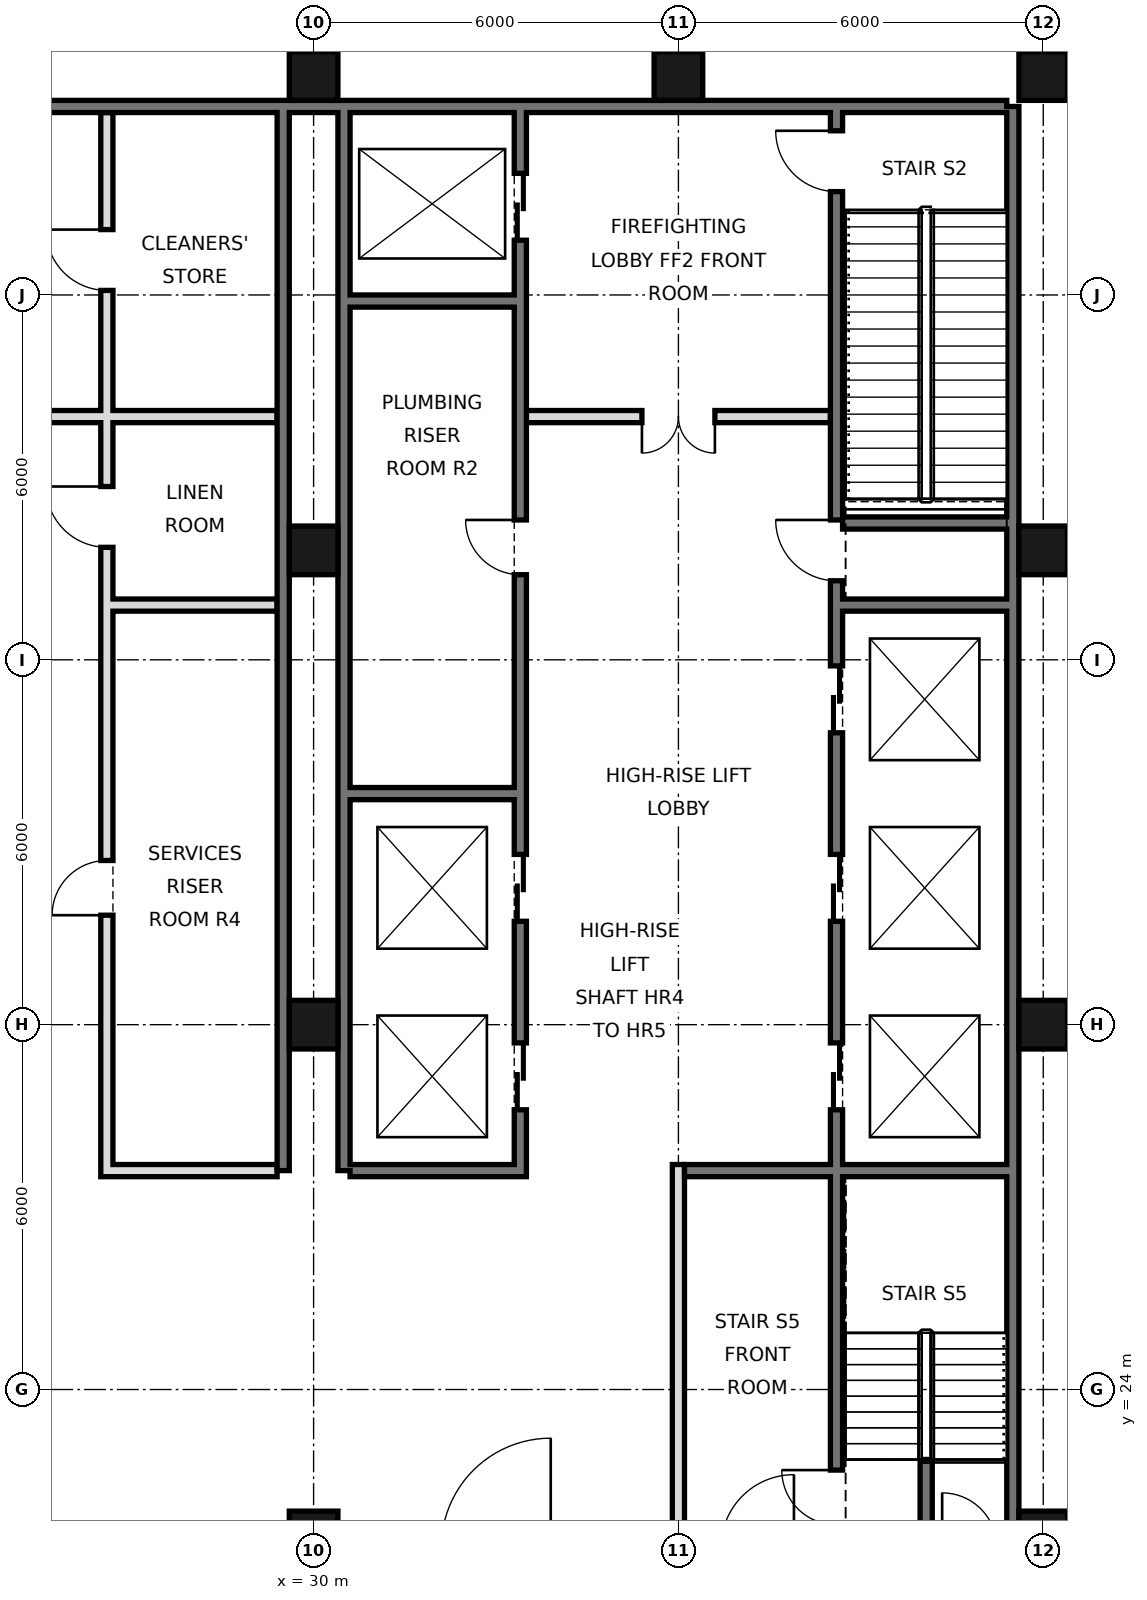
"""IFC4 building model, lengths in metres.
Left out: names, types, materials, properties, quantities, classifications, styles, units other than length and angle.
Written with IfcOpenShell. Run it as: python <this file> out.ifc"""

import sys

from ifc_helpers import new_model, si_unit, direction, frame, frame_2d, origin, origin_2d, place, context, subcontext, project, spatial, rectangle, hollow_rectangle, extrude, element, fill, save


model = new_model("IFC4")
c1 = context("Model", 3, precision=1e-05, world=origin(), true_north=direction((0.0, 1.0)))
c2 = subcontext(c1, "Body", "Model", "MODEL_VIEW")
j1 = project(units=[si_unit("LENGTHUNIT", "METRE"), si_unit("PLANEANGLEUNIT", "RADIAN")], contexts=[c1])
p1 = place(None, origin())
s1 = spatial("IfcSite", under=j1, at=p1, CompositionType="ELEMENT")
p2 = place(p1, origin())
s2 = spatial("IfcBuilding", under=s1, at=p2, CompositionType="ELEMENT")
p3 = place(p2, frame((0.0, 0.0, 186.0)))
s3 = spatial("IfcBuildingStorey", under=s2, at=p3, CompositionType="ELEMENT", Elevation=186.0)
for number, where, z_axis, x_axis in (
    (1, (30.0, 21.6, 0.0), (0.0, 0.0, 1.0), (1.0, 0.0, 0.0)),
    (2, (30.0, 30.0, 0.0), (0.0, 0.0, 1.0), (1.0, 0.0, 0.0)),
    (3, (30.0, 37.8, 0.0), (0.0, 0.0, 1.0), (1.0, 0.0, 0.0)),
    (4, (30.0, 45.6, 0.0), (0.0, 0.0, 1.0), (1.0, 0.0, 0.0)),
    (5, (36.0, 45.6, 0.0), (0.0, 0.0, 1.0), (1.0, 0.0, 0.0)),
    (6, (42.0, 21.6, 0.0), (0.0, 0.0, 1.0), (1.0, 0.0, 0.0)),
    (7, (42.0, 30.0, 0.0), (0.0, 0.0, 1.0), (1.0, 0.0, 0.0)),
    (8, (42.0, 37.8, 0.0), (0.0, 0.0, 1.0), (1.0, 0.0, 0.0)),
    (9, (42.0, 45.6, 0.0), (0.0, 0.0, 1.0), (1.0, 0.0, 0.0)),
):
    element("IfcColumn", number, at=place(p3, frame(where, z_axis=z_axis, x_axis=x_axis)), inside=s3, PredefinedType="COLUMN", context=c2, shape_type="SweptSolid", body=[
        extrude(hollow_rectangle(XDim=0.8, YDim=0.8, WallThickness=0.045, at=origin_2d()), origin(), (0.0, 0.0, 1.0), 6.0),
    ])
p4 = place(p3, frame((41.5, 21.6, 0.0), z_axis=(0.0, 0.0, 1.0), x_axis=(0.0, 1.0, 0.0)))
e10 = element("IfcWall", 10, at=p4, inside=s3, PredefinedType="SOLIDWALL", context=c2, shape_type="SweptSolid", body=[
    extrude(rectangle(XDim=23.5, YDim=0.2, at=frame_2d((11.75, 0.0))), origin(), (0.0, 0.0, 1.0), 5.7),
])
p5 = place(p3, frame((6.6, 45.1, 0.0), z_axis=(0.0, 0.0, 1.0), x_axis=(1.0, 0.0, 0.0)))
e11 = element("IfcWall", 11, at=p5, inside=s3, PredefinedType="SOLIDWALL", context=c2, shape_type="SweptSolid", body=[
    extrude(rectangle(XDim=34.8, YDim=0.2, at=frame_2d((17.4, 0.0))), origin(), (0.0, 0.0, 1.0), 5.7),
])
for number, where, z_axis, x_axis in (
    (12, (29.5, 27.6, 0.0), (0.0, 0.0, 1.0), (0.0, 1.0, 0.0)),
    (13, (30.5, 27.6, 0.0), (0.0, 0.0, 1.0), (0.0, 1.0, 0.0)),
):
    element("IfcWall", number, at=place(p3, frame(where, z_axis=z_axis, x_axis=x_axis)), inside=s3, PredefinedType="SOLIDWALL", context=c2, shape_type="SweptSolid", body=[
        extrude(rectangle(XDim=17.5, YDim=0.2, at=frame_2d((8.75, 0.0))), origin(), (0.0, 0.0, 1.0), 5.7),
    ])
p6 = place(p3, frame((26.6, 27.5, 0.0), z_axis=(0.0, 0.0, 1.0), x_axis=(0.0, 1.0, 0.0)))
e14 = element("IfcWall", 14, at=p6, inside=s3, PredefinedType="SOLIDWALL", context=c2, shape_type="SweptSolid", body=[
    extrude(rectangle(XDim=17.5, YDim=0.2, at=frame_2d((8.75, 0.0))), origin(), (0.0, 0.0, 1.0), 5.7),
])
p7 = place(p6, frame((4.3, 0.0, 0.0)))
e15 = element("IfcOpeningElement", 15, at=p7, cuts=e14, PredefinedType="OPENING", context=c2, shape_type="SweptSolid", body=[
    extrude(rectangle(XDim=0.9, YDim=2.1, at=frame_2d((0.45, 1.05))), frame((0.0, 0.11, 0.0), z_axis=(0.0, -1.0, 0.0), x_axis=(1.0, 0.0, 0.0)), (0.0, 0.0, 1.0), 0.22),
])
p8 = place(p6, frame((10.35, 0.0, 0.0)))
e16 = element("IfcOpeningElement", 16, at=p8, cuts=e14, PredefinedType="OPENING", context=c2, shape_type="SweptSolid", body=[
    extrude(rectangle(XDim=1.0, YDim=2.1, at=frame_2d((0.5, 1.05))), frame((0.0, 0.11, 0.0), z_axis=(0.0, -1.0, 0.0), x_axis=(1.0, 0.0, 0.0)), (0.0, 0.0, 1.0), 0.22),
])
p9 = place(p6, frame((14.575, 0.0, 0.0)))
e17 = element("IfcOpeningElement", 17, at=p9, cuts=e14, PredefinedType="OPENING", context=c2, shape_type="SweptSolid", body=[
    extrude(rectangle(XDim=1.0, YDim=2.1, at=frame_2d((0.5, 1.05))), frame((0.0, 0.11, 0.0), z_axis=(0.0, -1.0, 0.0), x_axis=(1.0, 0.0, 0.0)), (0.0, 0.0, 1.0), 0.22),
])
p10 = place(p3, frame((33.4, 27.5, 0.0), z_axis=(0.0, 0.0, 1.0), x_axis=(0.0, 1.0, 0.0)))
e18 = element("IfcWall", 18, at=p10, inside=s3, PredefinedType="SOLIDWALL", context=c2, shape_type="SweptSolid", body=[
    extrude(rectangle(XDim=17.5, YDim=0.2, at=frame_2d((8.75, 0.0))), origin(), (0.0, 0.0, 1.0), 5.7),
])
p11 = place(p10, frame((1.1, 0.0, 0.0)))
e19 = element("IfcOpeningElement", 19, at=p11, cuts=e18, PredefinedType="OPENING", context=c2, shape_type="SweptSolid", body=[
    extrude(rectangle(XDim=1.1, YDim=2.1, at=frame_2d((0.55, 1.05))), frame((0.0, 0.11, 0.0), z_axis=(0.0, -1.0, 0.0), x_axis=(1.0, 0.0, 0.0)), (0.0, 0.0, 1.0), 0.22),
])
p12 = place(p10, frame((4.2, 0.0, 0.0)))
e20 = element("IfcOpeningElement", 20, at=p12, cuts=e18, PredefinedType="OPENING", context=c2, shape_type="SweptSolid", body=[
    extrude(rectangle(XDim=1.1, YDim=2.1, at=frame_2d((0.55, 1.05))), frame((0.0, 0.11, 0.0), z_axis=(0.0, -1.0, 0.0), x_axis=(1.0, 0.0, 0.0)), (0.0, 0.0, 1.0), 0.22),
])
p13 = place(p10, frame((15.4, 0.0, 0.0)))
e21 = element("IfcOpeningElement", 21, at=p13, cuts=e18, PredefinedType="OPENING", context=c2, shape_type="SweptSolid", body=[
    extrude(rectangle(XDim=1.1, YDim=2.1, at=frame_2d((0.55, 1.05))), frame((0.0, 0.11, 0.0), z_axis=(0.0, -1.0, 0.0), x_axis=(1.0, 0.0, 0.0)), (0.0, 0.0, 1.0), 0.22),
])
p14 = place(p10, frame((9.9, 0.0, 0.0)))
e22 = element("IfcOpeningElement", 22, at=p14, cuts=e18, PredefinedType="OPENING", context=c2, shape_type="SweptSolid", body=[
    extrude(rectangle(XDim=0.9, YDim=2.1, at=frame_2d((0.45, 1.05))), frame((0.0, 0.11, 0.0), z_axis=(0.0, -1.0, 0.0), x_axis=(1.0, 0.0, 0.0)), (0.0, 0.0, 1.0), 0.22),
])
p15 = place(p3, frame((36.0, 21.6, 0.0), z_axis=(0.0, 0.0, 1.0), x_axis=(0.0, 1.0, 0.0)))
e23 = element("IfcWall", 23, at=p15, inside=s3, PredefinedType="PARTITIONING", context=c2, shape_type="SweptSolid", body=[
    extrude(rectangle(XDim=6.1, YDim=0.2, at=frame_2d((3.05, 0.0))), origin(), (0.0, 0.0, 1.0), 5.7),
])
p16 = place(p3, frame((38.6, 21.6, 0.0), z_axis=(0.0, 0.0, 1.0), x_axis=(0.0, 1.0, 0.0)))
e24 = element("IfcWall", 24, at=p16, inside=s3, PredefinedType="SOLIDWALL", context=c2, shape_type="SweptSolid", body=[
    extrude(rectangle(XDim=23.4, YDim=0.2, at=frame_2d((11.7, 0.0))), origin(), (0.0, 0.0, 1.0), 5.7),
])
p17 = place(p16, frame((7.0, 0.0, 0.0)))
e25 = element("IfcOpeningElement", 25, at=p17, cuts=e24, PredefinedType="OPENING", context=c2, shape_type="SweptSolid", body=[
    extrude(rectangle(XDim=1.1, YDim=2.1, at=frame_2d((0.55, 1.05))), frame((0.0, 0.11, 0.0), z_axis=(0.0, -1.0, 0.0), x_axis=(1.0, 0.0, 0.0)), (0.0, 0.0, 1.0), 0.22),
])
p18 = place(p16, frame((10.1, 0.0, 0.0)))
e26 = element("IfcOpeningElement", 26, at=p18, cuts=e24, PredefinedType="OPENING", context=c2, shape_type="SweptSolid", body=[
    extrude(rectangle(XDim=1.1, YDim=2.1, at=frame_2d((0.55, 1.05))), frame((0.0, 0.11, 0.0), z_axis=(0.0, -1.0, 0.0), x_axis=(1.0, 0.0, 0.0)), (0.0, 0.0, 1.0), 0.22),
])
p19 = place(p16, frame((13.2, 0.0, 0.0)))
e27 = element("IfcOpeningElement", 27, at=p19, cuts=e24, PredefinedType="OPENING", context=c2, shape_type="SweptSolid", body=[
    extrude(rectangle(XDim=1.1, YDim=2.1, at=frame_2d((0.55, 1.05))), frame((0.0, 0.11, 0.0), z_axis=(0.0, -1.0, 0.0), x_axis=(1.0, 0.0, 0.0)), (0.0, 0.0, 1.0), 0.22),
])
p20 = place(p16, frame((15.7, 0.0, 0.0)))
e28 = element("IfcOpeningElement", 28, at=p20, cuts=e24, PredefinedType="OPENING", context=c2, shape_type="SweptSolid", body=[
    extrude(rectangle(XDim=1.0, YDim=2.1, at=frame_2d((0.5, 1.05))), frame((0.0, 0.11, 0.0), z_axis=(0.0, -1.0, 0.0), x_axis=(1.0, 0.0, 0.0)), (0.0, 0.0, 1.0), 0.22),
])
p21 = place(p16, frame((22.1, 0.0, 0.0)))
e29 = element("IfcOpeningElement", 29, at=p21, cuts=e24, PredefinedType="OPENING", context=c2, shape_type="SweptSolid", body=[
    extrude(rectangle(XDim=1.0, YDim=2.1, at=frame_2d((0.5, 1.05))), frame((0.0, 0.11, 0.0), z_axis=(0.0, -1.0, 0.0), x_axis=(1.0, 0.0, 0.0)), (0.0, 0.0, 1.0), 0.22),
])
p22 = place(p16, frame((0.175, 0.0, 0.0)))
e30 = element("IfcOpeningElement", 30, at=p22, cuts=e24, PredefinedType="OPENING", context=c2, shape_type="SweptSolid", body=[
    extrude(rectangle(XDim=0.9, YDim=2.1, at=frame_2d((0.45, 1.05))), frame((0.0, 0.11, 0.0), z_axis=(0.0, -1.0, 0.0), x_axis=(1.0, 0.0, 0.0)), (0.0, 0.0, 1.0), 0.22),
])
p23 = place(p3, frame((40.075, 21.6, 0.0), z_axis=(0.0, 0.0, 1.0), x_axis=(0.0, 1.0, 0.0)))
e31 = element("IfcWall", 31, at=p23, inside=s3, PredefinedType="SOLIDWALL", context=c2, shape_type="SweptSolid", body=[
    extrude(rectangle(XDim=1.25, YDim=0.2, at=frame_2d((0.625, 0.0))), origin(), (0.0, 0.0, 1.0), 5.7),
])
for number, where, z_axis, x_axis in (
    (32, (26.7, 27.6, 0.0), (0.0, 0.0, 1.0), (1.0, 0.0, 0.0)),
    (33, (30.6, 27.6, 0.0), (0.0, 0.0, 1.0), (1.0, 0.0, 0.0)),
):
    element("IfcWall", number, at=place(p3, frame(where, z_axis=z_axis, x_axis=x_axis)), inside=s3, PredefinedType="SOLIDWALL", context=c2, shape_type="SweptSolid", body=[
        extrude(rectangle(XDim=2.7, YDim=0.2, at=frame_2d((1.35, 0.0))), origin(), (0.0, 0.0, 1.0), 5.7),
    ])
p24 = place(p3, frame((36.1, 27.6, 0.0), z_axis=(0.0, 0.0, 1.0), x_axis=(1.0, 0.0, 0.0)))
e34 = element("IfcWall", 34, at=p24, inside=s3, PredefinedType="SOLIDWALL", context=c2, shape_type="SweptSolid", body=[
    extrude(rectangle(XDim=5.3, YDim=0.2, at=frame_2d((2.65, 0.0))), origin(), (0.0, 0.0, 1.0), 5.7),
])
for number, where, z_axis, x_axis in (
    (35, (30.6, 33.8, 0.0), (0.0, 0.0, 1.0), (1.0, 0.0, 0.0)),
    (36, (26.7, 36.9, 0.0), (0.0, 0.0, 1.0), (1.0, 0.0, 0.0)),
    (37, (38.7, 36.9, 0.0), (0.0, 0.0, 1.0), (1.0, 0.0, 0.0)),
):
    element("IfcWall", number, at=place(p3, frame(where, z_axis=z_axis, x_axis=x_axis)), inside=s3, PredefinedType="SOLIDWALL", context=c2, shape_type="SweptSolid", body=[
        extrude(rectangle(XDim=2.7, YDim=0.2, at=frame_2d((1.35, 0.0))), origin(), (0.0, 0.0, 1.0), 5.7),
    ])
p25 = place(p3, frame((38.7, 38.25, 0.0), z_axis=(0.0, 0.0, 1.0), x_axis=(1.0, 0.0, 0.0)))
e38 = element("IfcWall", 38, at=p25, inside=s3, PredefinedType="SOLIDWALL", context=c2, shape_type="SweptSolid", body=[
    extrude(rectangle(XDim=2.7, YDim=0.2, at=frame_2d((1.35, 0.0))), origin(), (0.0, 0.0, 1.0), 2.8),
])
p26 = place(p3, frame((21.5, 40.0, 0.0), z_axis=(0.0, 0.0, 1.0), x_axis=(1.0, 0.0, 0.0)))
e39 = element("IfcWall", 39, at=p26, inside=s3, PredefinedType="PARTITIONING", context=c2, shape_type="SweptSolid", body=[
    extrude(rectangle(XDim=7.9, YDim=0.2, at=frame_2d((3.95, 0.0))), origin(), (0.0, 0.0, 1.0), 5.7),
])
p27 = place(p26, frame((1.9, 0.0, 0.0)))
e40 = element("IfcOpeningElement", 40, at=p27, cuts=e39, PredefinedType="OPENING", context=c2, shape_type="SweptSolid", body=[
    extrude(rectangle(XDim=1.2, YDim=2.1, at=frame_2d((0.6, 1.05))), frame((0.0, 0.11, 0.0), z_axis=(0.0, -1.0, 0.0), x_axis=(1.0, 0.0, 0.0)), (0.0, 0.0, 1.0), 0.22),
])
p28 = place(p3, frame((33.5, 40.0, 0.0), z_axis=(0.0, 0.0, 1.0), x_axis=(1.0, 0.0, 0.0)))
e41 = element("IfcWall", 41, at=p28, inside=s3, PredefinedType="PARTITIONING", context=c2, shape_type="SweptSolid", body=[
    extrude(rectangle(XDim=5.0, YDim=0.2, at=frame_2d((2.5, 0.0))), origin(), (0.0, 0.0, 1.0), 5.7),
])
p29 = place(p28, frame((1.9, 0.0, 0.0)))
e42 = element("IfcOpeningElement", 42, at=p29, cuts=e41, PredefinedType="OPENING", context=c2, shape_type="SweptSolid", body=[
    extrude(rectangle(XDim=1.2, YDim=2.1, at=frame_2d((0.6, 1.05))), frame((0.0, 0.11, 0.0), z_axis=(0.0, -1.0, 0.0), x_axis=(1.0, 0.0, 0.0)), (0.0, 0.0, 1.0), 0.22),
])
p30 = place(p3, frame((30.6, 41.9, 0.0), z_axis=(0.0, 0.0, 1.0), x_axis=(1.0, 0.0, 0.0)))
e43 = element("IfcWall", 43, at=p30, inside=s3, PredefinedType="SOLIDWALL", context=c2, shape_type="SweptSolid", body=[
    extrude(rectangle(XDim=2.7, YDim=0.2, at=frame_2d((1.35, 0.0))), origin(), (0.0, 0.0, 1.0), 5.7),
])
p31 = place(p29, frame((1.2, 0.0, 0.0), z_axis=(0.0, 0.0, 1.0), x_axis=(-1.0, 0.0, 0.0)))
e44 = element("IfcDoor", 44, at=p31, inside=s3, OperationType="DOUBLE_DOOR_SINGLE_SWING", PredefinedType="DOOR", context=c2, shape_type="SweptSolid", body=[
    extrude(rectangle(XDim=1.2, YDim=2.1, at=frame_2d((0.6, 1.05))), frame((0.0, 0.025, 0.0), z_axis=(0.0, -1.0, 0.0), x_axis=(1.0, 0.0, 0.0)), (0.0, 0.0, 1.0), 0.05),
])
fill(e42, e44)
p32 = place(p17, origin())
e45 = element("IfcDoor", 45, at=p32, inside=s3, OperationType="DOUBLE_DOOR_SLIDING", PredefinedType="DOOR", context=c2, shape_type="SweptSolid", body=[
    extrude(rectangle(XDim=1.1, YDim=2.1, at=frame_2d((0.55, 1.05))), frame((0.0, 0.025, 0.0), z_axis=(0.0, -1.0, 0.0), x_axis=(1.0, 0.0, 0.0)), (0.0, 0.0, 1.0), 0.05),
])
fill(e25, e45)
p33 = place(p18, origin())
e46 = element("IfcDoor", 46, at=p33, inside=s3, OperationType="DOUBLE_DOOR_SLIDING", PredefinedType="DOOR", context=c2, shape_type="SweptSolid", body=[
    extrude(rectangle(XDim=1.1, YDim=2.1, at=frame_2d((0.55, 1.05))), frame((0.0, 0.025, 0.0), z_axis=(0.0, -1.0, 0.0), x_axis=(1.0, 0.0, 0.0)), (0.0, 0.0, 1.0), 0.05),
])
fill(e26, e46)
p34 = place(p19, origin())
e47 = element("IfcDoor", 47, at=p34, inside=s3, OperationType="DOUBLE_DOOR_SLIDING", PredefinedType="DOOR", context=c2, shape_type="SweptSolid", body=[
    extrude(rectangle(XDim=1.1, YDim=2.1, at=frame_2d((0.55, 1.05))), frame((0.0, 0.025, 0.0), z_axis=(0.0, -1.0, 0.0), x_axis=(1.0, 0.0, 0.0)), (0.0, 0.0, 1.0), 0.05),
])
fill(e27, e47)
p35 = place(p11, origin())
e48 = element("IfcDoor", 48, at=p35, inside=s3, OperationType="DOUBLE_DOOR_SLIDING", PredefinedType="DOOR", context=c2, shape_type="SweptSolid", body=[
    extrude(rectangle(XDim=1.1, YDim=2.1, at=frame_2d((0.55, 1.05))), frame((0.0, 0.025, 0.0), z_axis=(0.0, -1.0, 0.0), x_axis=(1.0, 0.0, 0.0)), (0.0, 0.0, 1.0), 0.05),
])
fill(e19, e48)
p36 = place(p12, origin())
e49 = element("IfcDoor", 49, at=p36, inside=s3, OperationType="DOUBLE_DOOR_SLIDING", PredefinedType="DOOR", context=c2, shape_type="SweptSolid", body=[
    extrude(rectangle(XDim=1.1, YDim=2.1, at=frame_2d((0.55, 1.05))), frame((0.0, 0.025, 0.0), z_axis=(0.0, -1.0, 0.0), x_axis=(1.0, 0.0, 0.0)), (0.0, 0.0, 1.0), 0.05),
])
fill(e20, e49)
p37 = place(p13, origin())
e50 = element("IfcDoor", 50, at=p37, inside=s3, OperationType="DOUBLE_DOOR_SLIDING", PredefinedType="DOOR", context=c2, shape_type="SweptSolid", body=[
    extrude(rectangle(XDim=1.1, YDim=2.1, at=frame_2d((0.55, 1.05))), frame((0.0, 0.025, 0.0), z_axis=(0.0, -1.0, 0.0), x_axis=(1.0, 0.0, 0.0)), (0.0, 0.0, 1.0), 0.05),
])
fill(e21, e50)
p38 = place(p20, frame((1.0, 0.0, 0.0), z_axis=(0.0, 0.0, 1.0), x_axis=(-1.0, 0.0, 0.0)))
e51 = element("IfcDoor", 51, at=p38, inside=s3, OperationType="SINGLE_SWING_LEFT", PredefinedType="DOOR", context=c2, shape_type="SweptSolid", body=[
    extrude(rectangle(XDim=1.0, YDim=2.1, at=frame_2d((0.5, 1.05))), frame((0.0, 0.025, 0.0), z_axis=(0.0, -1.0, 0.0), x_axis=(1.0, 0.0, 0.0)), (0.0, 0.0, 1.0), 0.05),
])
fill(e28, e51)
p39 = place(p21, frame((1.0, 0.0, 0.0), z_axis=(0.0, 0.0, 1.0), x_axis=(-1.0, 0.0, 0.0)))
e52 = element("IfcDoor", 52, at=p39, inside=s3, OperationType="SINGLE_SWING_LEFT", PredefinedType="DOOR", context=c2, shape_type="SweptSolid", body=[
    extrude(rectangle(XDim=1.0, YDim=2.1, at=frame_2d((0.5, 1.05))), frame((0.0, 0.025, 0.0), z_axis=(0.0, -1.0, 0.0), x_axis=(1.0, 0.0, 0.0)), (0.0, 0.0, 1.0), 0.05),
])
fill(e29, e52)
p40 = place(p22, frame((0.9, 0.0, 0.0), z_axis=(0.0, 0.0, 1.0), x_axis=(-1.0, 0.0, 0.0)))
e53 = element("IfcDoor", 53, at=p40, inside=s3, OperationType="SINGLE_SWING_LEFT", PredefinedType="DOOR", context=c2, shape_type="SweptSolid", body=[
    extrude(rectangle(XDim=0.9, YDim=2.1, at=frame_2d((0.45, 1.05))), frame((0.0, 0.025, 0.0), z_axis=(0.0, -1.0, 0.0), x_axis=(1.0, 0.0, 0.0)), (0.0, 0.0, 1.0), 0.05),
])
fill(e30, e53)
p41 = place(p14, frame((0.9, 0.0, 0.0), z_axis=(0.0, 0.0, 1.0), x_axis=(-1.0, 0.0, 0.0)))
e54 = element("IfcDoor", 54, at=p41, inside=s3, OperationType="SINGLE_SWING_LEFT", PredefinedType="DOOR", context=c2, shape_type="SweptSolid", body=[
    extrude(rectangle(XDim=0.9, YDim=2.1, at=frame_2d((0.45, 1.05))), frame((0.0, 0.025, 0.0), z_axis=(0.0, -1.0, 0.0), x_axis=(1.0, 0.0, 0.0)), (0.0, 0.0, 1.0), 0.05),
])
fill(e22, e54)
p42 = place(p7, origin())
e55 = element("IfcDoor", 55, at=p42, inside=s3, OperationType="SINGLE_SWING_LEFT", PredefinedType="DOOR", context=c2, shape_type="SweptSolid", body=[
    extrude(rectangle(XDim=0.9, YDim=2.1, at=frame_2d((0.45, 1.05))), frame((0.0, 0.025, 0.0), z_axis=(0.0, -1.0, 0.0), x_axis=(1.0, 0.0, 0.0)), (0.0, 0.0, 1.0), 0.05),
])
fill(e15, e55)
p43 = place(p8, frame((1.0, 0.0, 0.0), z_axis=(0.0, 0.0, 1.0), x_axis=(-1.0, 0.0, 0.0)))
e56 = element("IfcDoor", 56, at=p43, inside=s3, OperationType="SINGLE_SWING_LEFT", PredefinedType="DOOR", context=c2, shape_type="SweptSolid", body=[
    extrude(rectangle(XDim=1.0, YDim=2.1, at=frame_2d((0.5, 1.05))), frame((0.0, 0.025, 0.0), z_axis=(0.0, -1.0, 0.0), x_axis=(1.0, 0.0, 0.0)), (0.0, 0.0, 1.0), 0.05),
])
fill(e16, e56)
p44 = place(p9, frame((1.0, 0.0, 0.0), z_axis=(0.0, 0.0, 1.0), x_axis=(-1.0, 0.0, 0.0)))
e57 = element("IfcDoor", 57, at=p44, inside=s3, OperationType="SINGLE_SWING_LEFT", PredefinedType="DOOR", context=c2, shape_type="SweptSolid", body=[
    extrude(rectangle(XDim=1.0, YDim=2.1, at=frame_2d((0.5, 1.05))), frame((0.0, 0.025, 0.0), z_axis=(0.0, -1.0, 0.0), x_axis=(1.0, 0.0, 0.0)), (0.0, 0.0, 1.0), 0.05),
])
fill(e17, e57)
save(model, sys.argv[1])
